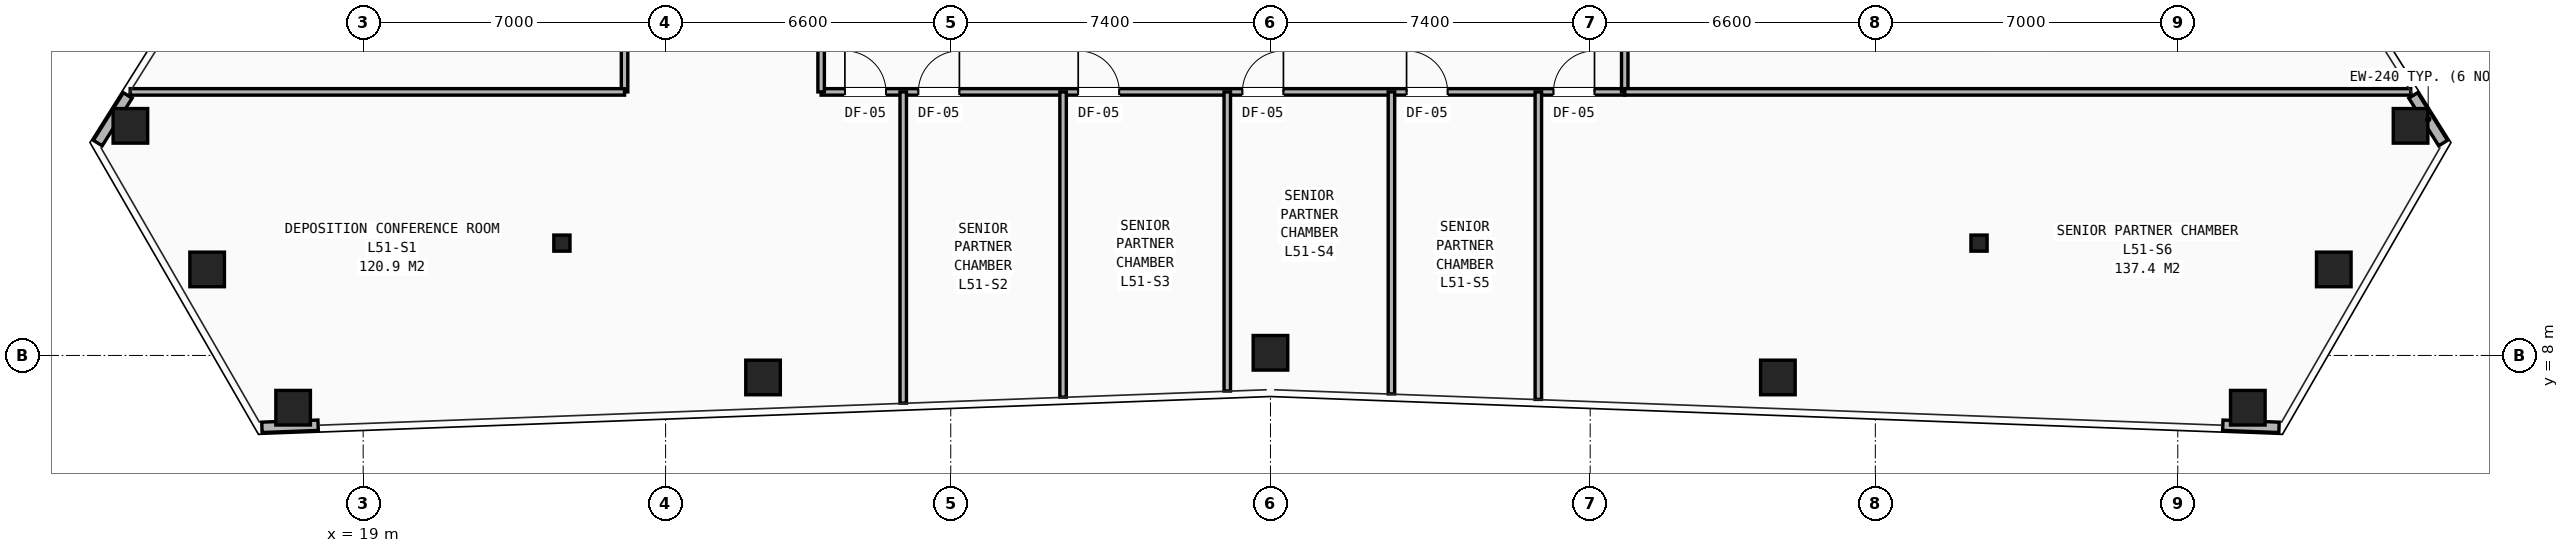
"""IFC4 building model, lengths in metres.
Left out: names, types, materials, properties, quantities, classifications, styles, units other than length and angle.
Written with IfcOpenShell. Run it as: python <this file> out.ifc"""

import sys

from ifc_helpers import new_model, si_unit, direction, frame, frame_2d, origin, origin_2d, place, context, subcontext, project, spatial, rectangle, hollow_rectangle, i_section, extrude, element, fill, save


model = new_model("IFC4")
c1 = context("Model", 3, precision=1e-05, world=origin(), true_north=direction((0.0, 1.0)))
c2 = subcontext(c1, "Body", "Model", "MODEL_VIEW")
j1 = project(units=[si_unit("LENGTHUNIT", "METRE"), si_unit("PLANEANGLEUNIT", "RADIAN")], contexts=[c1])
p1 = place(None, origin())
s1 = spatial("IfcSite", under=j1, at=p1, CompositionType="ELEMENT")
p2 = place(p1, origin())
s2 = spatial("IfcBuilding", under=s1, at=p2, CompositionType="ELEMENT")
p3 = place(p2, frame((0.0, 0.0, 179.25)))
s3 = spatial("IfcBuildingStorey", under=s2, at=p3, CompositionType="ELEMENT", Elevation=179.25)
for number, where, z_axis, x_axis in (
    (1, (23.6, 10.6, 0.0), (0.0, 0.0, 1.0), (1.0, 0.0, 0.0)),
    (2, (56.4, 10.6, 0.0), (0.0, 0.0, 1.0), (1.0, 0.0, 0.0)),
):
    element("IfcColumn", number, at=place(p3, frame(where, z_axis=z_axis, x_axis=x_axis)), inside=s3, PredefinedType="COLUMN", context=c2, shape_type="SweptSolid", body=[
        extrude(i_section(OverallWidth=0.374, OverallDepth=0.372, WebThickness=0.016, FlangeThickness=0.026, at=origin_2d()), origin(), (0.0, 0.0, 1.0), 3.45),
    ])
for number, where, z_axis, x_axis in (
    (3, (13.612, 13.314, 0.0), (0.0, 0.0, 1.0), (1.0, 0.0, 0.0)),
    (4, (15.389, 9.991, 0.0), (0.0, 0.0, 1.0), (1.0, 0.0, 0.0)),
    (5, (17.379, 6.791, 0.0), (0.0, 0.0, 1.0), (1.0, 0.0, 0.0)),
    (6, (28.256, 7.491, 0.0), (0.0, 0.0, 1.0), (1.0, 0.0, 0.0)),
    (7, (40.0, 8.061, 0.0), (0.0, 0.0, 1.0), (1.0, 0.0, 0.0)),
    (8, (51.744, 7.491, 0.0), (0.0, 0.0, 1.0), (1.0, 0.0, 0.0)),
    (9, (62.621, 6.791, 0.0), (0.0, 0.0, 1.0), (1.0, 0.0, 0.0)),
    (10, (64.611, 9.991, 0.0), (0.0, 0.0, 1.0), (1.0, 0.0, 0.0)),
    (11, (66.388, 13.314, 0.0), (0.0, 0.0, 1.0), (1.0, 0.0, 0.0)),
):
    element("IfcColumn", number, at=place(p3, frame(where, z_axis=z_axis, x_axis=x_axis)), inside=s3, PredefinedType="COLUMN", context=c2, shape_type="SweptSolid", body=[
        extrude(hollow_rectangle(XDim=0.8, YDim=0.8, WallThickness=0.055, at=origin_2d()), origin(), (0.0, 0.0, 1.0), 3.45),
    ])
for number, where, z_axis, x_axis in (
    (12, (13.551, 14.018, 0.0), (0.0, 0.0, 1.0), (-0.532, -0.847, 0.0)),
    (13, (16.657, 6.336, 0.0), (0.0, 0.0, 1.0), (0.999, 0.037, 0.0)),
    (14, (62.042, 6.385, 0.0), (0.0, 0.0, 1.0), (0.999, -0.037, 0.0)),
    (15, (67.142, 12.916, 0.0), (0.0, 0.0, 1.0), (-0.532, 0.847, 0.0)),
):
    element("IfcWall", number, at=place(p3, frame(where, z_axis=z_axis, x_axis=x_axis)), inside=s3, PredefinedType="SHEAR", context=c2, shape_type="SweptSolid", body=[
        extrude(rectangle(XDim=1.302, YDim=0.24, at=frame_2d((0.651, 0.0))), origin(), (0.0, 0.0, 1.0), 2.583),
    ])
p4 = place(p3, frame((29.6, 14.1, 0.0), z_axis=(0.0, 0.0, 1.0), x_axis=(1.0, 0.0, 0.0)))
e16 = element("IfcWall", 16, at=p4, inside=s3, PredefinedType="PARTITIONING", context=c2, shape_type="SweptSolid", body=[
    extrude(rectangle(XDim=18.6, YDim=0.15, at=frame_2d((9.3, 0.0))), origin(), (0.0, 0.0, 1.0), 2.225),
])
p5 = place(p4, frame((0.55, 0.0, 0.0)))
e17 = element("IfcOpeningElement", 17, at=p5, cuts=e16, PredefinedType="OPENING", context=c2, shape_type="SweptSolid", body=[
    extrude(rectangle(XDim=0.95, YDim=2.1, at=frame_2d((0.475, 1.05))), frame((0.0, 0.085, 0.0), z_axis=(0.0, -1.0, 0.0), x_axis=(1.0, 0.0, 0.0)), (0.0, 0.0, 1.0), 0.17),
])
p6 = place(p4, frame((2.25, 0.0, 0.0)))
e18 = element("IfcOpeningElement", 18, at=p6, cuts=e16, PredefinedType="OPENING", context=c2, shape_type="SweptSolid", body=[
    extrude(rectangle(XDim=0.95, YDim=2.1, at=frame_2d((0.475, 1.05))), frame((0.0, 0.085, 0.0), z_axis=(0.0, -1.0, 0.0), x_axis=(1.0, 0.0, 0.0)), (0.0, 0.0, 1.0), 0.17),
])
p7 = place(p4, frame((5.95, 0.0, 0.0)))
e19 = element("IfcOpeningElement", 19, at=p7, cuts=e16, PredefinedType="OPENING", context=c2, shape_type="SweptSolid", body=[
    extrude(rectangle(XDim=0.95, YDim=2.1, at=frame_2d((0.475, 1.05))), frame((0.0, 0.085, 0.0), z_axis=(0.0, -1.0, 0.0), x_axis=(1.0, 0.0, 0.0)), (0.0, 0.0, 1.0), 0.17),
])
p8 = place(p4, frame((9.75, 0.0, 0.0)))
e20 = element("IfcOpeningElement", 20, at=p8, cuts=e16, PredefinedType="OPENING", context=c2, shape_type="SweptSolid", body=[
    extrude(rectangle(XDim=0.95, YDim=2.1, at=frame_2d((0.475, 1.05))), frame((0.0, 0.085, 0.0), z_axis=(0.0, -1.0, 0.0), x_axis=(1.0, 0.0, 0.0)), (0.0, 0.0, 1.0), 0.17),
])
p9 = place(p4, frame((13.55, 0.0, 0.0)))
e21 = element("IfcOpeningElement", 21, at=p9, cuts=e16, PredefinedType="OPENING", context=c2, shape_type="SweptSolid", body=[
    extrude(rectangle(XDim=0.95, YDim=2.1, at=frame_2d((0.475, 1.05))), frame((0.0, 0.085, 0.0), z_axis=(0.0, -1.0, 0.0), x_axis=(1.0, 0.0, 0.0)), (0.0, 0.0, 1.0), 0.17),
])
p10 = place(p4, frame((16.95, 0.0, 0.0)))
e22 = element("IfcOpeningElement", 22, at=p10, cuts=e16, PredefinedType="OPENING", context=c2, shape_type="SweptSolid", body=[
    extrude(rectangle(XDim=0.95, YDim=2.1, at=frame_2d((0.475, 1.05))), frame((0.0, 0.085, 0.0), z_axis=(0.0, -1.0, 0.0), x_axis=(1.0, 0.0, 0.0)), (0.0, 0.0, 1.0), 0.17),
])
p11 = place(p3, frame((48.2, 14.1, 0.0), z_axis=(0.0, 0.0, 1.0), x_axis=(0.0, 1.0, 0.0)))
e23 = element("IfcWall", 23, at=p11, inside=s3, PredefinedType="PARTITIONING", context=c2, shape_type="SweptSolid", body=[
    extrude(rectangle(XDim=2.3, YDim=0.15, at=frame_2d((1.15, 0.0))), origin(), (0.0, 0.0, 1.0), 2.665),
])
p12 = place(p3, frame((29.6, 14.1, 0.0), z_axis=(0.0, 0.0, 1.0), x_axis=(0.0, 1.0, 0.0)))
e24 = element("IfcWall", 24, at=p12, inside=s3, PredefinedType="PARTITIONING", context=c2, shape_type="SweptSolid", body=[
    extrude(rectangle(XDim=8.7, YDim=0.15, at=frame_2d((4.35, 0.0))), origin(), (0.0, 0.0, 1.0), 3.21),
])
p13 = place(p12, frame((2.65, 0.0, 0.0)))
e25 = element("IfcOpeningElement", 25, at=p13, cuts=e24, PredefinedType="OPENING", context=c2, shape_type="SweptSolid", body=[
    extrude(rectangle(XDim=0.85, YDim=2.05, at=frame_2d((0.425, 1.025))), frame((0.0, 0.085, 0.0), z_axis=(0.0, -1.0, 0.0), x_axis=(1.0, 0.0, 0.0)), (0.0, 0.0, 1.0), 0.17),
])
p14 = place(p12, frame((4.75, 0.0, 0.0)))
e26 = element("IfcOpeningElement", 26, at=p14, cuts=e24, PredefinedType="OPENING", context=c2, shape_type="SweptSolid", body=[
    extrude(rectangle(XDim=0.85, YDim=2.05, at=frame_2d((0.425, 1.025))), frame((0.0, 0.085, 0.0), z_axis=(0.0, -1.0, 0.0), x_axis=(1.0, 0.0, 0.0)), (0.0, 0.0, 1.0), 0.17),
])
p15 = place(p12, frame((6.85, 0.0, 0.0)))
e27 = element("IfcOpeningElement", 27, at=p15, cuts=e24, PredefinedType="OPENING", context=c2, shape_type="SweptSolid", body=[
    extrude(rectangle(XDim=0.85, YDim=2.05, at=frame_2d((0.425, 1.025))), frame((0.0, 0.085, 0.0), z_axis=(0.0, -1.0, 0.0), x_axis=(1.0, 0.0, 0.0)), (0.0, 0.0, 1.0), 0.17),
])
p16 = place(p3, frame((25.05, 14.1, 0.0), z_axis=(0.0, 0.0, 1.0), x_axis=(0.0, 1.0, 0.0)))
e28 = element("IfcWall", 28, at=p16, inside=s3, PredefinedType="PARTITIONING", context=c2, shape_type="SweptSolid", body=[
    extrude(rectangle(XDim=8.7, YDim=0.15, at=frame_2d((4.35, 0.0))), origin(), (0.0, 0.0, 1.0), 3.21),
])
p17 = place(p3, frame((31.5, 6.896, 0.0), z_axis=(0.0, 0.0, 1.0), x_axis=(0.0, 1.0, 0.0)))
e29 = element("IfcWall", 29, at=p17, inside=s3, PredefinedType="PARTITIONING", context=c2, shape_type="SweptSolid", body=[
    extrude(rectangle(XDim=7.204, YDim=0.15, at=frame_2d((3.602, 0.0))), origin(), (0.0, 0.0, 1.0), 2.589),
])
p18 = place(p3, frame((35.2, 7.035, 0.0), z_axis=(0.0, 0.0, 1.0), x_axis=(0.0, 1.0, 0.0)))
e30 = element("IfcWall", 30, at=p18, inside=s3, PredefinedType="PARTITIONING", context=c2, shape_type="SweptSolid", body=[
    extrude(rectangle(XDim=7.065, YDim=0.15, at=frame_2d((3.533, 0.0))), origin(), (0.0, 0.0, 1.0), 2.225),
])
p19 = place(p3, frame((39.0, 7.177, 0.0), z_axis=(0.0, 0.0, 1.0), x_axis=(0.0, 1.0, 0.0)))
e31 = element("IfcWall", 31, at=p19, inside=s3, PredefinedType="PARTITIONING", context=c2, shape_type="SweptSolid", body=[
    extrude(rectangle(XDim=6.923, YDim=0.15, at=frame_2d((3.461, 0.0))), origin(), (0.0, 0.0, 1.0), 2.225),
])
p20 = place(p3, frame((42.8, 7.11, 0.0), z_axis=(0.0, 0.0, 1.0), x_axis=(0.0, 1.0, 0.0)))
e32 = element("IfcWall", 32, at=p20, inside=s3, PredefinedType="PARTITIONING", context=c2, shape_type="SweptSolid", body=[
    extrude(rectangle(XDim=6.99, YDim=0.15, at=frame_2d((3.495, 0.0))), origin(), (0.0, 0.0, 1.0), 2.589),
])
p21 = place(p3, frame((46.2, 6.983, 0.0), z_axis=(0.0, 0.0, 1.0), x_axis=(0.0, 1.0, 0.0)))
e33 = element("IfcWall", 33, at=p21, inside=s3, PredefinedType="PARTITIONING", context=c2, shape_type="SweptSolid", body=[
    extrude(rectangle(XDim=7.117, YDim=0.15, at=frame_2d((3.559, 0.0))), origin(), (0.0, 0.0, 1.0), 2.589),
])
p22 = place(p3, frame((13.608, 14.1, 0.0), z_axis=(0.0, 0.0, 1.0), x_axis=(1.0, 0.0, 0.0)))
e34 = element("IfcWall", 34, at=p22, inside=s3, PredefinedType="PARTITIONING", context=c2, shape_type="SweptSolid", body=[
    extrude(rectangle(XDim=11.442, YDim=0.15, at=frame_2d((5.721, 0.0))), origin(), (0.0, 0.0, 1.0), 2.589),
])
p23 = place(p3, frame((48.2, 14.1, 0.0), z_axis=(0.0, 0.0, 1.0), x_axis=(1.0, 0.0, 0.0)))
e35 = element("IfcWall", 35, at=p23, inside=s3, PredefinedType="PARTITIONING", context=c2, shape_type="SweptSolid", body=[
    extrude(rectangle(XDim=18.192, YDim=0.15, at=frame_2d((9.096, 0.0))), origin(), (0.0, 0.0, 1.0), 2.589),
])
p24 = place(p5, origin())
e36 = element("IfcDoor", 36, at=p24, inside=s3, OperationType="SINGLE_SWING_LEFT", PredefinedType="DOOR", context=c2, shape_type="SweptSolid", body=[
    extrude(rectangle(XDim=0.95, YDim=2.1, at=frame_2d((0.475, 1.05))), frame((0.0, 0.025, 0.0), z_axis=(0.0, -1.0, 0.0), x_axis=(1.0, 0.0, 0.0)), (0.0, 0.0, 1.0), 0.05),
])
fill(e17, e36)
p25 = place(p6, origin())
e37 = element("IfcDoor", 37, at=p25, inside=s3, OperationType="SINGLE_SWING_RIGHT", PredefinedType="DOOR", context=c2, shape_type="SweptSolid", body=[
    extrude(rectangle(XDim=0.95, YDim=2.1, at=frame_2d((0.475, 1.05))), frame((0.0, 0.025, 0.0), z_axis=(0.0, -1.0, 0.0), x_axis=(1.0, 0.0, 0.0)), (0.0, 0.0, 1.0), 0.05),
])
fill(e18, e37)
p26 = place(p7, origin())
e38 = element("IfcDoor", 38, at=p26, inside=s3, OperationType="SINGLE_SWING_LEFT", PredefinedType="DOOR", context=c2, shape_type="SweptSolid", body=[
    extrude(rectangle(XDim=0.95, YDim=2.1, at=frame_2d((0.475, 1.05))), frame((0.0, 0.025, 0.0), z_axis=(0.0, -1.0, 0.0), x_axis=(1.0, 0.0, 0.0)), (0.0, 0.0, 1.0), 0.05),
])
fill(e19, e38)
p27 = place(p8, origin())
e39 = element("IfcDoor", 39, at=p27, inside=s3, OperationType="SINGLE_SWING_RIGHT", PredefinedType="DOOR", context=c2, shape_type="SweptSolid", body=[
    extrude(rectangle(XDim=0.95, YDim=2.1, at=frame_2d((0.475, 1.05))), frame((0.0, 0.025, 0.0), z_axis=(0.0, -1.0, 0.0), x_axis=(1.0, 0.0, 0.0)), (0.0, 0.0, 1.0), 0.05),
])
fill(e20, e39)
p28 = place(p9, origin())
e40 = element("IfcDoor", 40, at=p28, inside=s3, OperationType="SINGLE_SWING_LEFT", PredefinedType="DOOR", context=c2, shape_type="SweptSolid", body=[
    extrude(rectangle(XDim=0.95, YDim=2.1, at=frame_2d((0.475, 1.05))), frame((0.0, 0.025, 0.0), z_axis=(0.0, -1.0, 0.0), x_axis=(1.0, 0.0, 0.0)), (0.0, 0.0, 1.0), 0.05),
])
fill(e21, e40)
p29 = place(p10, origin())
e41 = element("IfcDoor", 41, at=p29, inside=s3, OperationType="SINGLE_SWING_RIGHT", PredefinedType="DOOR", context=c2, shape_type="SweptSolid", body=[
    extrude(rectangle(XDim=0.95, YDim=2.1, at=frame_2d((0.475, 1.05))), frame((0.0, 0.025, 0.0), z_axis=(0.0, -1.0, 0.0), x_axis=(1.0, 0.0, 0.0)), (0.0, 0.0, 1.0), 0.05),
])
fill(e22, e41)
save(model, sys.argv[1])
